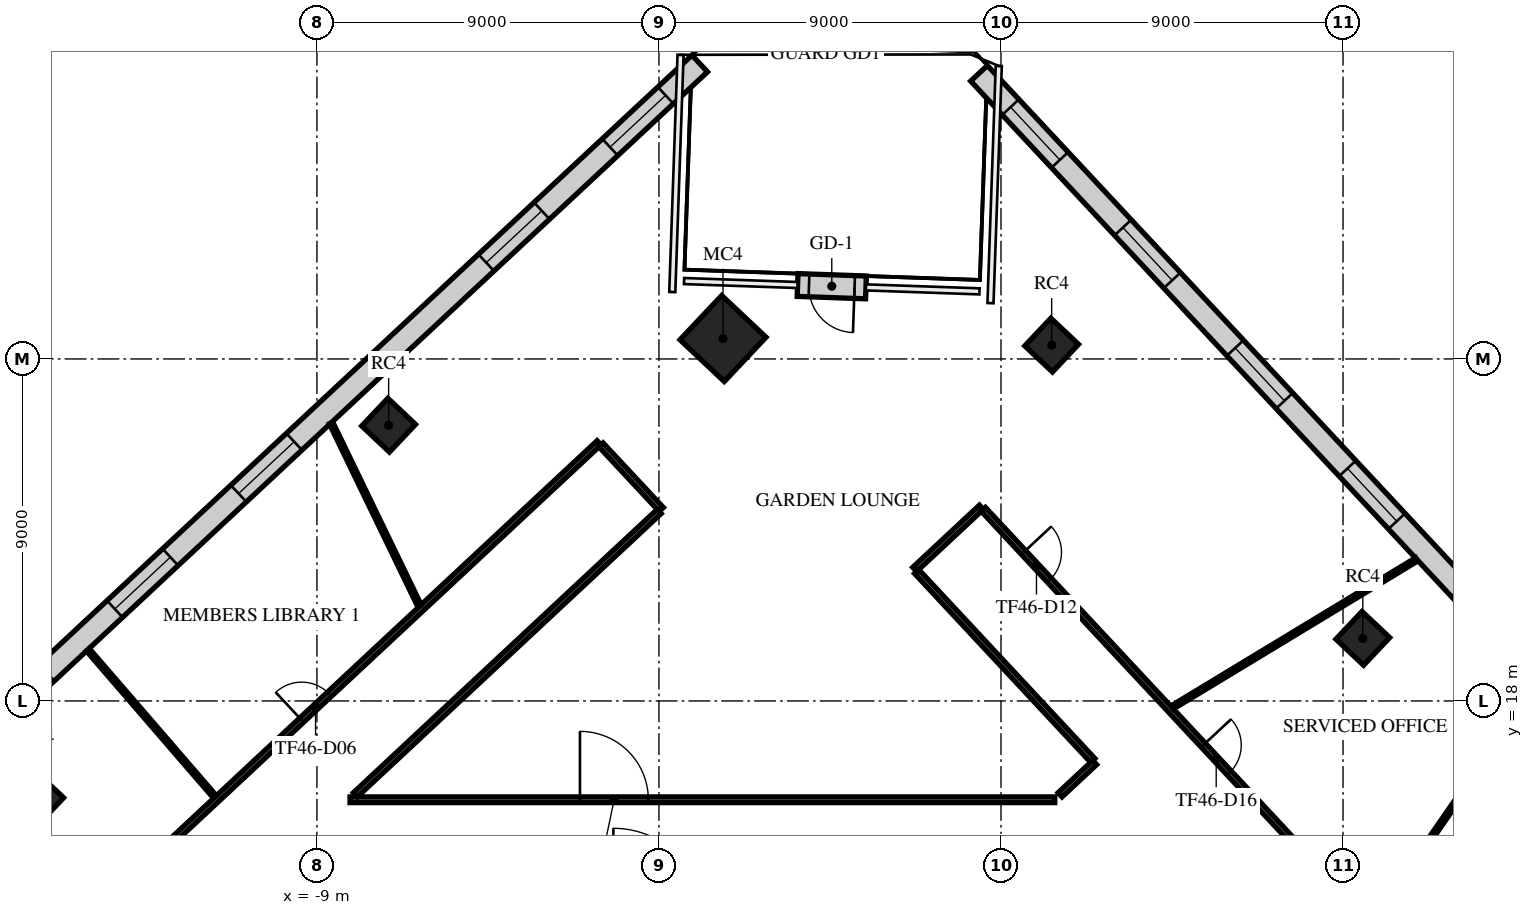
"""IFC4 building model, lengths in metres.
Left out: names, types, materials, properties, quantities, classifications, styles, units other than length and angle.
Written with IfcOpenShell. Run it as: python <this file> out.ifc"""

import sys

from ifc_helpers import new_model, si_unit, direction, frame, frame_2d, origin, origin_2d, place, context, subcontext, project, spatial, rectangle, extrude, element, fill, save


model = new_model("IFC4")
c1 = context("Model", 3, precision=1e-05, world=origin(), true_north=direction((0.0, 1.0)))
c2 = subcontext(c1, "Body", "Model", "MODEL_VIEW")
j1 = project(units=[si_unit("LENGTHUNIT", "METRE"), si_unit("PLANEANGLEUNIT", "RADIAN")], contexts=[c1])
p1 = place(None, origin())
s1 = spatial("IfcSite", under=j1, at=p1, CompositionType="ELEMENT")
p2 = place(p1, origin())
s2 = spatial("IfcBuilding", under=s1, at=p2, CompositionType="ELEMENT")
p3 = place(p2, frame((0.0, 0.0, 197.3)))
s3 = spatial("IfcBuildingStorey", under=s2, at=p3, CompositionType="ELEMENT", Elevation=197.3)
p4 = place(p3, frame((1.685, 27.538, 0.0), z_axis=(0.0, 0.0, 1.0), x_axis=(0.685916152371, 0.727680583715, 0.0)))
e1 = element("IfcColumn", 1, at=p4, inside=s3, PredefinedType="COLUMN", context=c2, shape_type="SweptSolid", body=[
    extrude(rectangle(XDim=1.6, YDim=1.6, at=origin_2d()), origin(), (0.0, 0.0, 1.0), 4.0),
])
for number, where, z_axis, x_axis in (
    (2, (-7.113, 25.257, 0.0), (0.0, 0.0, 1.0), (0.686, 0.728, 0.0)),
    (3, (-16.373, 15.433, 0.0), (0.0, 0.0, 1.0), (0.686, 0.728, 0.0)),
    (4, (18.52, 19.647, 0.0), (0.0, 0.0, 1.0), (0.686, 0.728, 0.0)),
    (5, (10.333, 27.364, 0.0), (0.0, 0.0, 1.0), (0.686, 0.728, 0.0)),
):
    element("IfcColumn", number, at=place(p3, frame(where, z_axis=z_axis, x_axis=x_axis)), inside=s3, PredefinedType="COLUMN", context=c2, shape_type="SweptSolid", body=[
        extrude(rectangle(XDim=1.0, YDim=1.0, at=origin_2d()), origin(), (0.0, 0.0, 1.0), 4.0),
    ])
p5 = place(p3, frame((1.073, 34.773, 0.0), z_axis=(0.0, 0.0, 1.0), x_axis=(-0.731351780381, -0.682000420333, 0.0)))
e6 = element("IfcWall", 6, at=p5, inside=s3, PredefinedType="STANDARD", context=c2, shape_type="SweptSolid", body=[
    extrude(rectangle(XDim=49.0, YDim=0.6, at=frame_2d((24.5, 0.0))), origin(), (0.0, 0.0, 1.0), 3.62),
])
p6 = place(p5, frame((1.227, 0.0, 0.9)))
e7 = element("IfcOpeningElement", 7, at=p6, cuts=e6, PredefinedType="OPENING", context=c2, shape_type="SweptSolid", body=[
    extrude(rectangle(XDim=2.0, YDim=2.1, at=frame_2d((1.0, 1.05))), frame((0.0, 0.31, 0.0), z_axis=(0.0, -1.0, 0.0), x_axis=(1.0, 0.0, 0.0)), (0.0, 0.0, 1.0), 0.62),
])
p7 = place(p5, frame((5.682, 0.0, 0.9)))
e8 = element("IfcOpeningElement", 8, at=p7, cuts=e6, PredefinedType="OPENING", context=c2, shape_type="SweptSolid", body=[
    extrude(rectangle(XDim=2.0, YDim=2.1, at=frame_2d((1.0, 1.05))), frame((0.0, 0.31, 0.0), z_axis=(0.0, -1.0, 0.0), x_axis=(1.0, 0.0, 0.0)), (0.0, 0.0, 1.0), 0.62),
])
p8 = place(p5, frame((14.591, 0.0, 0.9)))
e9 = element("IfcOpeningElement", 9, at=p8, cuts=e6, PredefinedType="OPENING", context=c2, shape_type="SweptSolid", body=[
    extrude(rectangle(XDim=2.0, YDim=2.1, at=frame_2d((1.0, 1.05))), frame((0.0, 0.31, 0.0), z_axis=(0.0, -1.0, 0.0), x_axis=(1.0, 0.0, 0.0)), (0.0, 0.0, 1.0), 0.62),
])
p9 = place(p5, frame((19.045, 0.0, 0.9)))
e10 = element("IfcOpeningElement", 10, at=p9, cuts=e6, PredefinedType="OPENING", context=c2, shape_type="SweptSolid", body=[
    extrude(rectangle(XDim=2.0, YDim=2.1, at=frame_2d((1.0, 1.05))), frame((0.0, 0.31, 0.0), z_axis=(0.0, -1.0, 0.0), x_axis=(1.0, 0.0, 0.0)), (0.0, 0.0, 1.0), 0.62),
])
p10 = place(p5, frame((23.5, 0.0, 0.9)))
e11 = element("IfcOpeningElement", 11, at=p10, cuts=e6, PredefinedType="OPENING", context=c2, shape_type="SweptSolid", body=[
    extrude(rectangle(XDim=2.0, YDim=2.1, at=frame_2d((1.0, 1.05))), frame((0.0, 0.31, 0.0), z_axis=(0.0, -1.0, 0.0), x_axis=(1.0, 0.0, 0.0)), (0.0, 0.0, 1.0), 0.62),
])
p11 = place(p5, frame((27.955, 0.0, 0.9)))
e12 = element("IfcOpeningElement", 12, at=p11, cuts=e6, PredefinedType="OPENING", context=c2, shape_type="SweptSolid", body=[
    extrude(rectangle(XDim=2.0, YDim=2.1, at=frame_2d((1.0, 1.05))), frame((0.0, 0.31, 0.0), z_axis=(0.0, -1.0, 0.0), x_axis=(1.0, 0.0, 0.0)), (0.0, 0.0, 1.0), 0.62),
])
p12 = place(p5, frame((32.409, 0.0, 0.9)))
e13 = element("IfcOpeningElement", 13, at=p12, cuts=e6, PredefinedType="OPENING", context=c2, shape_type="SweptSolid", body=[
    extrude(rectangle(XDim=2.0, YDim=2.1, at=frame_2d((1.0, 1.05))), frame((0.0, 0.31, 0.0), z_axis=(0.0, -1.0, 0.0), x_axis=(1.0, 0.0, 0.0)), (0.0, 0.0, 1.0), 0.62),
])
p13 = place(p5, frame((36.864, 0.0, 0.9)))
e14 = element("IfcOpeningElement", 14, at=p13, cuts=e6, PredefinedType="OPENING", context=c2, shape_type="SweptSolid", body=[
    extrude(rectangle(XDim=2.0, YDim=2.1, at=frame_2d((1.0, 1.05))), frame((0.0, 0.31, 0.0), z_axis=(0.0, -1.0, 0.0), x_axis=(1.0, 0.0, 0.0)), (0.0, 0.0, 1.0), 0.62),
])
p14 = place(p5, frame((41.318, 0.0, 0.9)))
e15 = element("IfcOpeningElement", 15, at=p14, cuts=e6, PredefinedType="OPENING", context=c2, shape_type="SweptSolid", body=[
    extrude(rectangle(XDim=2.0, YDim=2.1, at=frame_2d((1.0, 1.05))), frame((0.0, 0.31, 0.0), z_axis=(0.0, -1.0, 0.0), x_axis=(1.0, 0.0, 0.0)), (0.0, 0.0, 1.0), 0.62),
])
p15 = place(p5, frame((45.773, 0.0, 0.9)))
e16 = element("IfcOpeningElement", 16, at=p15, cuts=e6, PredefinedType="OPENING", context=c2, shape_type="SweptSolid", body=[
    extrude(rectangle(XDim=2.0, YDim=2.1, at=frame_2d((1.0, 1.05))), frame((0.0, 0.31, 0.0), z_axis=(0.0, -1.0, 0.0), x_axis=(1.0, 0.0, 0.0)), (0.0, 0.0, 1.0), 0.62),
])
p16 = place(p3, frame((35.02, 5.994, 0.0), z_axis=(0.0, 0.0, 1.0), x_axis=(-0.682002361324, 0.731349970362, 0.0)))
e17 = element("IfcWall", 17, at=p16, inside=s3, PredefinedType="STANDARD", context=c2, shape_type="SweptSolid", body=[
    extrude(rectangle(XDim=39.0, YDim=0.6, at=frame_2d((19.5, 0.0))), origin(), (0.0, 0.0, 1.0), 3.62),
])
p17 = place(p16, frame((1.217, 0.0, 0.9)))
e18 = element("IfcOpeningElement", 18, at=p17, cuts=e17, PredefinedType="OPENING", context=c2, shape_type="SweptSolid", body=[
    extrude(rectangle(XDim=1.9, YDim=2.1, at=frame_2d((0.95, 1.05))), frame((0.0, 0.31, 0.0), z_axis=(0.0, -1.0, 0.0), x_axis=(1.0, 0.0, 0.0)), (0.0, 0.0, 1.0), 0.62),
])
p18 = place(p16, frame((5.55, 0.0, 0.9)))
e19 = element("IfcOpeningElement", 19, at=p18, cuts=e17, PredefinedType="OPENING", context=c2, shape_type="SweptSolid", body=[
    extrude(rectangle(XDim=1.9, YDim=2.1, at=frame_2d((0.95, 1.05))), frame((0.0, 0.31, 0.0), z_axis=(0.0, -1.0, 0.0), x_axis=(1.0, 0.0, 0.0)), (0.0, 0.0, 1.0), 0.62),
])
p19 = place(p16, frame((9.883, 0.0, 0.9)))
e20 = element("IfcOpeningElement", 20, at=p19, cuts=e17, PredefinedType="OPENING", context=c2, shape_type="SweptSolid", body=[
    extrude(rectangle(XDim=1.9, YDim=2.1, at=frame_2d((0.95, 1.05))), frame((0.0, 0.31, 0.0), z_axis=(0.0, -1.0, 0.0), x_axis=(1.0, 0.0, 0.0)), (0.0, 0.0, 1.0), 0.62),
])
p20 = place(p16, frame((14.217, 0.0, 0.9)))
e21 = element("IfcOpeningElement", 21, at=p20, cuts=e17, PredefinedType="OPENING", context=c2, shape_type="SweptSolid", body=[
    extrude(rectangle(XDim=1.9, YDim=2.1, at=frame_2d((0.95, 1.05))), frame((0.0, 0.31, 0.0), z_axis=(0.0, -1.0, 0.0), x_axis=(1.0, 0.0, 0.0)), (0.0, 0.0, 1.0), 0.62),
])
p21 = place(p16, frame((18.55, 0.0, 0.9)))
e22 = element("IfcOpeningElement", 22, at=p21, cuts=e17, PredefinedType="OPENING", context=c2, shape_type="SweptSolid", body=[
    extrude(rectangle(XDim=1.9, YDim=2.1, at=frame_2d((0.95, 1.05))), frame((0.0, 0.31, 0.0), z_axis=(0.0, -1.0, 0.0), x_axis=(1.0, 0.0, 0.0)), (0.0, 0.0, 1.0), 0.62),
])
p22 = place(p16, frame((22.883, 0.0, 0.9)))
e23 = element("IfcOpeningElement", 23, at=p22, cuts=e17, PredefinedType="OPENING", context=c2, shape_type="SweptSolid", body=[
    extrude(rectangle(XDim=1.9, YDim=2.1, at=frame_2d((0.95, 1.05))), frame((0.0, 0.31, 0.0), z_axis=(0.0, -1.0, 0.0), x_axis=(1.0, 0.0, 0.0)), (0.0, 0.0, 1.0), 0.62),
])
p23 = place(p16, frame((27.217, 0.0, 0.9)))
e24 = element("IfcOpeningElement", 24, at=p23, cuts=e17, PredefinedType="OPENING", context=c2, shape_type="SweptSolid", body=[
    extrude(rectangle(XDim=1.9, YDim=2.1, at=frame_2d((0.95, 1.05))), frame((0.0, 0.31, 0.0), z_axis=(0.0, -1.0, 0.0), x_axis=(1.0, 0.0, 0.0)), (0.0, 0.0, 1.0), 0.62),
])
p24 = place(p16, frame((31.55, 0.0, 0.9)))
e25 = element("IfcOpeningElement", 25, at=p24, cuts=e17, PredefinedType="OPENING", context=c2, shape_type="SweptSolid", body=[
    extrude(rectangle(XDim=1.9, YDim=2.1, at=frame_2d((0.95, 1.05))), frame((0.0, 0.31, 0.0), z_axis=(0.0, -1.0, 0.0), x_axis=(1.0, 0.0, 0.0)), (0.0, 0.0, 1.0), 0.62),
])
p25 = place(p16, frame((35.883, 0.0, 0.9)))
e26 = element("IfcOpeningElement", 26, at=p25, cuts=e17, PredefinedType="OPENING", context=c2, shape_type="SweptSolid", body=[
    extrude(rectangle(XDim=1.9, YDim=2.1, at=frame_2d((0.95, 1.05))), frame((0.0, 0.31, 0.0), z_axis=(0.0, -1.0, 0.0), x_axis=(1.0, 0.0, 0.0)), (0.0, 0.0, 1.0), 0.62),
])
p26 = place(p3, frame((5.447, 28.883, 0.0), z_axis=(0.0, 0.0, 1.0), x_axis=(-0.999387493042, 0.034994838926, 0.0)))
e27 = element("IfcWall", 27, at=p26, inside=s3, PredefinedType="STANDARD", context=c2, shape_type="SweptSolid", body=[
    extrude(rectangle(XDim=1.8, YDim=0.6, at=frame_2d((0.9, 0.0))), origin(), (0.0, 0.0, 1.0), 3.62),
])
p27 = place(p26, frame((0.3, 0.0, 0.0)))
e28 = element("IfcOpeningElement", 28, at=p27, cuts=e27, PredefinedType="OPENING", context=c2, shape_type="SweptSolid", body=[
    extrude(rectangle(XDim=1.2, YDim=2.4, at=frame_2d((0.6, 1.2))), frame((0.0, 0.31, 0.0), z_axis=(0.0, -1.0, 0.0), x_axis=(1.0, 0.0, 0.0)), (0.0, 0.0, 1.0), 0.62),
])
p28 = place(p3, frame((-24.623, 3.301, 0.0), z_axis=(0.0, 0.0, 1.0), x_axis=(0.731351215564, 0.68200102602, 0.0)))
e29 = element("IfcWall", 29, at=p28, inside=s3, PredefinedType="PARTITIONING", context=c2, shape_type="SweptSolid", body=[
    extrude(rectangle(XDim=31.513, YDim=0.15, at=frame_2d((15.757, 0.0))), origin(), (0.0, 0.0, 1.0), 3.17),
])
p29 = place(p28, frame((1.05, 0.0, 0.0)))
e30 = element("IfcOpeningElement", 30, at=p29, cuts=e29, PredefinedType="OPENING", context=c2, shape_type="SweptSolid", body=[
    extrude(rectangle(XDim=1.8, YDim=2.1, at=frame_2d((0.9, 1.05))), frame((0.0, 0.085, 0.0), z_axis=(0.0, -1.0, 0.0), x_axis=(1.0, 0.0, 0.0)), (0.0, 0.0, 1.0), 0.17),
])
p30 = place(p28, frame((5.55, 0.0, 0.0)))
e31 = element("IfcOpeningElement", 31, at=p30, cuts=e29, PredefinedType="OPENING", context=c2, shape_type="SweptSolid", body=[
    extrude(rectangle(XDim=1.0, YDim=2.1, at=frame_2d((0.5, 1.05))), frame((0.0, 0.085, 0.0), z_axis=(0.0, -1.0, 0.0), x_axis=(1.0, 0.0, 0.0)), (0.0, 0.0, 1.0), 0.17),
])
p31 = place(p28, frame((10.917, 0.0, 0.0)))
e32 = element("IfcOpeningElement", 32, at=p31, cuts=e29, PredefinedType="OPENING", context=c2, shape_type="SweptSolid", body=[
    extrude(rectangle(XDim=1.0, YDim=2.1, at=frame_2d((0.5, 1.05))), frame((0.0, 0.085, 0.0), z_axis=(0.0, -1.0, 0.0), x_axis=(1.0, 0.0, 0.0)), (0.0, 0.0, 1.0), 0.17),
])
p32 = place(p28, frame((20.812, 0.0, 0.0)))
e33 = element("IfcOpeningElement", 33, at=p32, cuts=e29, PredefinedType="OPENING", context=c2, shape_type="SweptSolid", body=[
    extrude(rectangle(XDim=1.0, YDim=2.1, at=frame_2d((0.5, 1.05))), frame((0.0, 0.085, 0.0), z_axis=(0.0, -1.0, 0.0), x_axis=(1.0, 0.0, 0.0)), (0.0, 0.0, 1.0), 0.17),
])
p33 = place(p3, frame((-8.129, 15.4, 0.0), z_axis=(0.0, 0.0, 1.0), x_axis=(1.0, 0.0, 0.0)))
e34 = element("IfcWall", 34, at=p33, inside=s3, PredefinedType="PARTITIONING", context=c2, shape_type="SweptSolid", body=[
    extrude(rectangle(XDim=18.544, YDim=0.15, at=frame_2d((9.272, 0.0))), origin(), (0.0, 0.0, 1.0), 3.17),
])
p34 = place(p33, frame((6.05, 0.0, 0.0)))
e35 = element("IfcOpeningElement", 35, at=p34, cuts=e34, PredefinedType="OPENING", context=c2, shape_type="SweptSolid", body=[
    extrude(rectangle(XDim=1.8, YDim=2.1, at=frame_2d((0.9, 1.05))), frame((0.0, 0.085, 0.0), z_axis=(0.0, -1.0, 0.0), x_axis=(1.0, 0.0, 0.0)), (0.0, 0.0, 1.0), 0.17),
])
p35 = place(p3, frame((-7.99, 15.53, 0.0), z_axis=(0.0, 0.0, 1.0), x_axis=(0.731318077891, 0.682036559834, 0.0)))
e36 = element("IfcWall", 36, at=p35, inside=s3, PredefinedType="PARTITIONING", context=c2, shape_type="SweptSolid", body=[
    extrude(rectangle(XDim=10.934, YDim=0.15, at=frame_2d((5.467, 0.0))), origin(), (0.0, 0.0, 1.0), 3.17),
])
p36 = place(p3, frame((-1.525, 24.738, 0.0), z_axis=(0.0, 0.0, 1.0), x_axis=(0.682161090026, -0.731201919619, 0.0)))
e37 = element("IfcWall", 37, at=p36, inside=s3, PredefinedType="PARTITIONING", context=c2, shape_type="SweptSolid", body=[
    extrude(rectangle(XDim=2.325, YDim=0.15, at=frame_2d((1.163, 0.0))), origin(), (0.0, 0.0, 1.0), 3.62),
])
p37 = place(p3, frame((6.729, 21.461, 0.0), z_axis=(0.0, 0.0, 1.0), x_axis=(0.731451066601, 0.681893933958, 0.0)))
e38 = element("IfcWall", 38, at=p37, inside=s3, PredefinedType="PARTITIONING", context=c2, shape_type="SweptSolid", body=[
    extrude(rectangle(XDim=2.399, YDim=0.15, at=frame_2d((1.2, 0.0))), origin(), (0.0, 0.0, 1.0), 3.62),
])
p38 = place(p3, frame((6.78, 21.406, 0.0), z_axis=(0.0, 0.0, 1.0), x_axis=(0.681923958899, -0.731423074752, 0.0)))
e39 = element("IfcWall", 39, at=p38, inside=s3, PredefinedType="PARTITIONING", context=c2, shape_type="SweptSolid", body=[
    extrude(rectangle(XDim=6.797, YDim=0.15, at=frame_2d((3.398, 0.0))), origin(), (0.0, 0.0, 1.0), 3.17),
])
p39 = place(p3, frame((8.535, 23.042, 0.0), z_axis=(0.0, 0.0, 1.0), x_axis=(0.68201130552, -0.73134162957, 0.0)))
e40 = element("IfcWall", 40, at=p39, inside=s3, PredefinedType="PARTITIONING", context=c2, shape_type="SweptSolid", body=[
    extrude(rectangle(XDim=22.137, YDim=0.15, at=frame_2d((11.069, 0.0))), origin(), (0.0, 0.0, 1.0), 3.17),
])
p40 = place(p39, frame((1.55, 0.0, 0.0)))
e41 = element("IfcOpeningElement", 41, at=p40, cuts=e40, PredefinedType="OPENING", context=c2, shape_type="SweptSolid", body=[
    extrude(rectangle(XDim=1.0, YDim=2.1, at=frame_2d((0.5, 1.05))), frame((0.0, 0.085, 0.0), z_axis=(0.0, -1.0, 0.0), x_axis=(1.0, 0.0, 0.0)), (0.0, 0.0, 1.0), 0.17),
])
p41 = place(p39, frame((8.485, 0.0, 0.0)))
e42 = element("IfcOpeningElement", 42, at=p41, cuts=e40, PredefinedType="OPENING", context=c2, shape_type="SweptSolid", body=[
    extrude(rectangle(XDim=1.0, YDim=2.1, at=frame_2d((0.5, 1.05))), frame((0.0, 0.085, 0.0), z_axis=(0.0, -1.0, 0.0), x_axis=(1.0, 0.0, 0.0)), (0.0, 0.0, 1.0), 0.17),
])
p42 = place(p3, frame((10.554, 15.53, 0.0), z_axis=(0.0, 0.0, 1.0), x_axis=(0.731445889193, 0.681899487596, 0.0)))
e43 = element("IfcWall", 43, at=p42, inside=s3, PredefinedType="PARTITIONING", context=c2, shape_type="SweptSolid", body=[
    extrude(rectangle(XDim=1.247, YDim=0.15, at=frame_2d((0.623, 0.0))), origin(), (0.0, 0.0, 1.0), 3.17),
])
p43 = place(p3, frame((-15.027, 19.347, 0.0), z_axis=(0.0, 0.0, 1.0), x_axis=(0.653552799086, -0.75688092776, 0.0)))
e44 = element("IfcWall", 44, at=p43, inside=s3, PredefinedType="PARTITIONING", context=c2, shape_type="SweptSolid", body=[
    extrude(rectangle(XDim=5.118, YDim=0.1, at=frame_2d((2.559, 0.0))), origin(), (0.0, 0.0, 1.0), 2.97),
])
p44 = place(p3, frame((-8.628, 25.315, 0.0), z_axis=(0.0, 0.0, 1.0), x_axis=(0.435360143591, -0.900256377579, 0.0)))
e45 = element("IfcWall", 45, at=p44, inside=s3, PredefinedType="PARTITIONING", context=c2, shape_type="SweptSolid", body=[
    extrude(rectangle(XDim=5.34, YDim=0.1, at=frame_2d((2.67, 0.0))), origin(), (0.0, 0.0, 1.0), 2.97),
])
p45 = place(p3, frame((13.51, 17.833, 0.0), z_axis=(0.0, 0.0, 1.0), x_axis=(0.855459551992, 0.517869631186, 0.0)))
e46 = element("IfcWall", 46, at=p45, inside=s3, PredefinedType="PARTITIONING", context=c2, shape_type="SweptSolid", body=[
    extrude(rectangle(XDim=7.515, YDim=0.1, at=frame_2d((3.757, 0.0))), origin(), (0.0, 0.0, 1.0), 2.97),
])
p46 = place(p3, frame((18.783, 12.179, 0.0), z_axis=(0.0, 0.0, 1.0), x_axis=(0.568978927241, 0.822352102421, 0.0)))
e47 = element("IfcWall", 47, at=p46, inside=s3, PredefinedType="PARTITIONING", context=c2, shape_type="SweptSolid", body=[
    extrude(rectangle(XDim=7.528, YDim=0.1, at=frame_2d((3.764, 0.0))), origin(), (0.0, 0.0, 1.0), 2.97),
])
p47 = place(p6, origin())
e48 = element("IfcWindow", 48, at=p47, inside=s3, PartitioningType="SINGLE_PANEL", PredefinedType="WINDOW", context=c2, shape_type="SweptSolid", body=[
    extrude(rectangle(XDim=2.0, YDim=2.1, at=frame_2d((1.0, 1.05))), frame((0.0, 0.03, 0.0), z_axis=(0.0, -1.0, 0.0), x_axis=(1.0, 0.0, 0.0)), (0.0, 0.0, 1.0), 0.06),
])
fill(e7, e48)
p48 = place(p7, origin())
e49 = element("IfcWindow", 49, at=p48, inside=s3, PartitioningType="SINGLE_PANEL", PredefinedType="WINDOW", context=c2, shape_type="SweptSolid", body=[
    extrude(rectangle(XDim=2.0, YDim=2.1, at=frame_2d((1.0, 1.05))), frame((0.0, 0.03, 0.0), z_axis=(0.0, -1.0, 0.0), x_axis=(1.0, 0.0, 0.0)), (0.0, 0.0, 1.0), 0.06),
])
fill(e8, e49)
p49 = place(p8, origin())
e50 = element("IfcWindow", 50, at=p49, inside=s3, PartitioningType="SINGLE_PANEL", PredefinedType="WINDOW", context=c2, shape_type="SweptSolid", body=[
    extrude(rectangle(XDim=2.0, YDim=2.1, at=frame_2d((1.0, 1.05))), frame((0.0, 0.03, 0.0), z_axis=(0.0, -1.0, 0.0), x_axis=(1.0, 0.0, 0.0)), (0.0, 0.0, 1.0), 0.06),
])
fill(e9, e50)
p50 = place(p9, origin())
e51 = element("IfcWindow", 51, at=p50, inside=s3, PartitioningType="SINGLE_PANEL", PredefinedType="WINDOW", context=c2, shape_type="SweptSolid", body=[
    extrude(rectangle(XDim=2.0, YDim=2.1, at=frame_2d((1.0, 1.05))), frame((0.0, 0.03, 0.0), z_axis=(0.0, -1.0, 0.0), x_axis=(1.0, 0.0, 0.0)), (0.0, 0.0, 1.0), 0.06),
])
fill(e10, e51)
p51 = place(p22, origin())
e52 = element("IfcWindow", 52, at=p51, inside=s3, PartitioningType="SINGLE_PANEL", PredefinedType="WINDOW", context=c2, shape_type="SweptSolid", body=[
    extrude(rectangle(XDim=1.9, YDim=2.1, at=frame_2d((0.95, 1.05))), frame((0.0, 0.03, 0.0), z_axis=(0.0, -1.0, 0.0), x_axis=(1.0, 0.0, 0.0)), (0.0, 0.0, 1.0), 0.06),
])
fill(e23, e52)
p52 = place(p23, origin())
e53 = element("IfcWindow", 53, at=p52, inside=s3, PartitioningType="SINGLE_PANEL", PredefinedType="WINDOW", context=c2, shape_type="SweptSolid", body=[
    extrude(rectangle(XDim=1.9, YDim=2.1, at=frame_2d((0.95, 1.05))), frame((0.0, 0.03, 0.0), z_axis=(0.0, -1.0, 0.0), x_axis=(1.0, 0.0, 0.0)), (0.0, 0.0, 1.0), 0.06),
])
fill(e24, e53)
p53 = place(p24, origin())
e54 = element("IfcWindow", 54, at=p53, inside=s3, PartitioningType="SINGLE_PANEL", PredefinedType="WINDOW", context=c2, shape_type="SweptSolid", body=[
    extrude(rectangle(XDim=1.9, YDim=2.1, at=frame_2d((0.95, 1.05))), frame((0.0, 0.03, 0.0), z_axis=(0.0, -1.0, 0.0), x_axis=(1.0, 0.0, 0.0)), (0.0, 0.0, 1.0), 0.06),
])
fill(e25, e54)
p54 = place(p25, origin())
e55 = element("IfcWindow", 55, at=p54, inside=s3, PartitioningType="SINGLE_PANEL", PredefinedType="WINDOW", context=c2, shape_type="SweptSolid", body=[
    extrude(rectangle(XDim=1.9, YDim=2.1, at=frame_2d((0.95, 1.05))), frame((0.0, 0.03, 0.0), z_axis=(0.0, -1.0, 0.0), x_axis=(1.0, 0.0, 0.0)), (0.0, 0.0, 1.0), 0.06),
])
fill(e26, e55)
p55 = place(p27, origin())
e56 = element("IfcDoor", 56, at=p55, inside=s3, OperationType="SINGLE_SWING_LEFT", PredefinedType="DOOR", context=c2, shape_type="SweptSolid", body=[
    extrude(rectangle(XDim=1.2, YDim=2.4, at=frame_2d((0.6, 1.2))), frame((0.0, 0.025, 0.0), z_axis=(0.0, -1.0, 0.0), x_axis=(1.0, 0.0, 0.0)), (0.0, 0.0, 1.0), 0.05),
])
fill(e28, e56)
p56 = place(p32, origin())
e57 = element("IfcDoor", 57, at=p56, inside=s3, OperationType="SINGLE_SWING_LEFT", PredefinedType="DOOR", context=c2, shape_type="SweptSolid", body=[
    extrude(rectangle(XDim=1.0, YDim=2.1, at=frame_2d((0.5, 1.05))), frame((0.0, 0.025, 0.0), z_axis=(0.0, -1.0, 0.0), x_axis=(1.0, 0.0, 0.0)), (0.0, 0.0, 1.0), 0.05),
])
fill(e33, e57)
p57 = place(p34, origin())
e58 = element("IfcDoor", 58, at=p57, inside=s3, OperationType="DOUBLE_DOOR_SINGLE_SWING", PredefinedType="DOOR", context=c2, shape_type="SweptSolid", body=[
    extrude(rectangle(XDim=1.8, YDim=2.1, at=frame_2d((0.9, 1.05))), frame((0.0, 0.025, 0.0), z_axis=(0.0, -1.0, 0.0), x_axis=(1.0, 0.0, 0.0)), (0.0, 0.0, 1.0), 0.05),
])
fill(e35, e58)
p58 = place(p40, origin())
e59 = element("IfcDoor", 59, at=p58, inside=s3, OperationType="SINGLE_SWING_RIGHT", PredefinedType="DOOR", context=c2, shape_type="SweptSolid", body=[
    extrude(rectangle(XDim=1.0, YDim=2.1, at=frame_2d((0.5, 1.05))), frame((0.0, 0.025, 0.0), z_axis=(0.0, -1.0, 0.0), x_axis=(1.0, 0.0, 0.0)), (0.0, 0.0, 1.0), 0.05),
])
fill(e41, e59)
p59 = place(p41, origin())
e60 = element("IfcDoor", 60, at=p59, inside=s3, OperationType="SINGLE_SWING_RIGHT", PredefinedType="DOOR", context=c2, shape_type="SweptSolid", body=[
    extrude(rectangle(XDim=1.0, YDim=2.1, at=frame_2d((0.5, 1.05))), frame((0.0, 0.025, 0.0), z_axis=(0.0, -1.0, 0.0), x_axis=(1.0, 0.0, 0.0)), (0.0, 0.0, 1.0), 0.05),
])
fill(e42, e60)
save(model, sys.argv[1])
